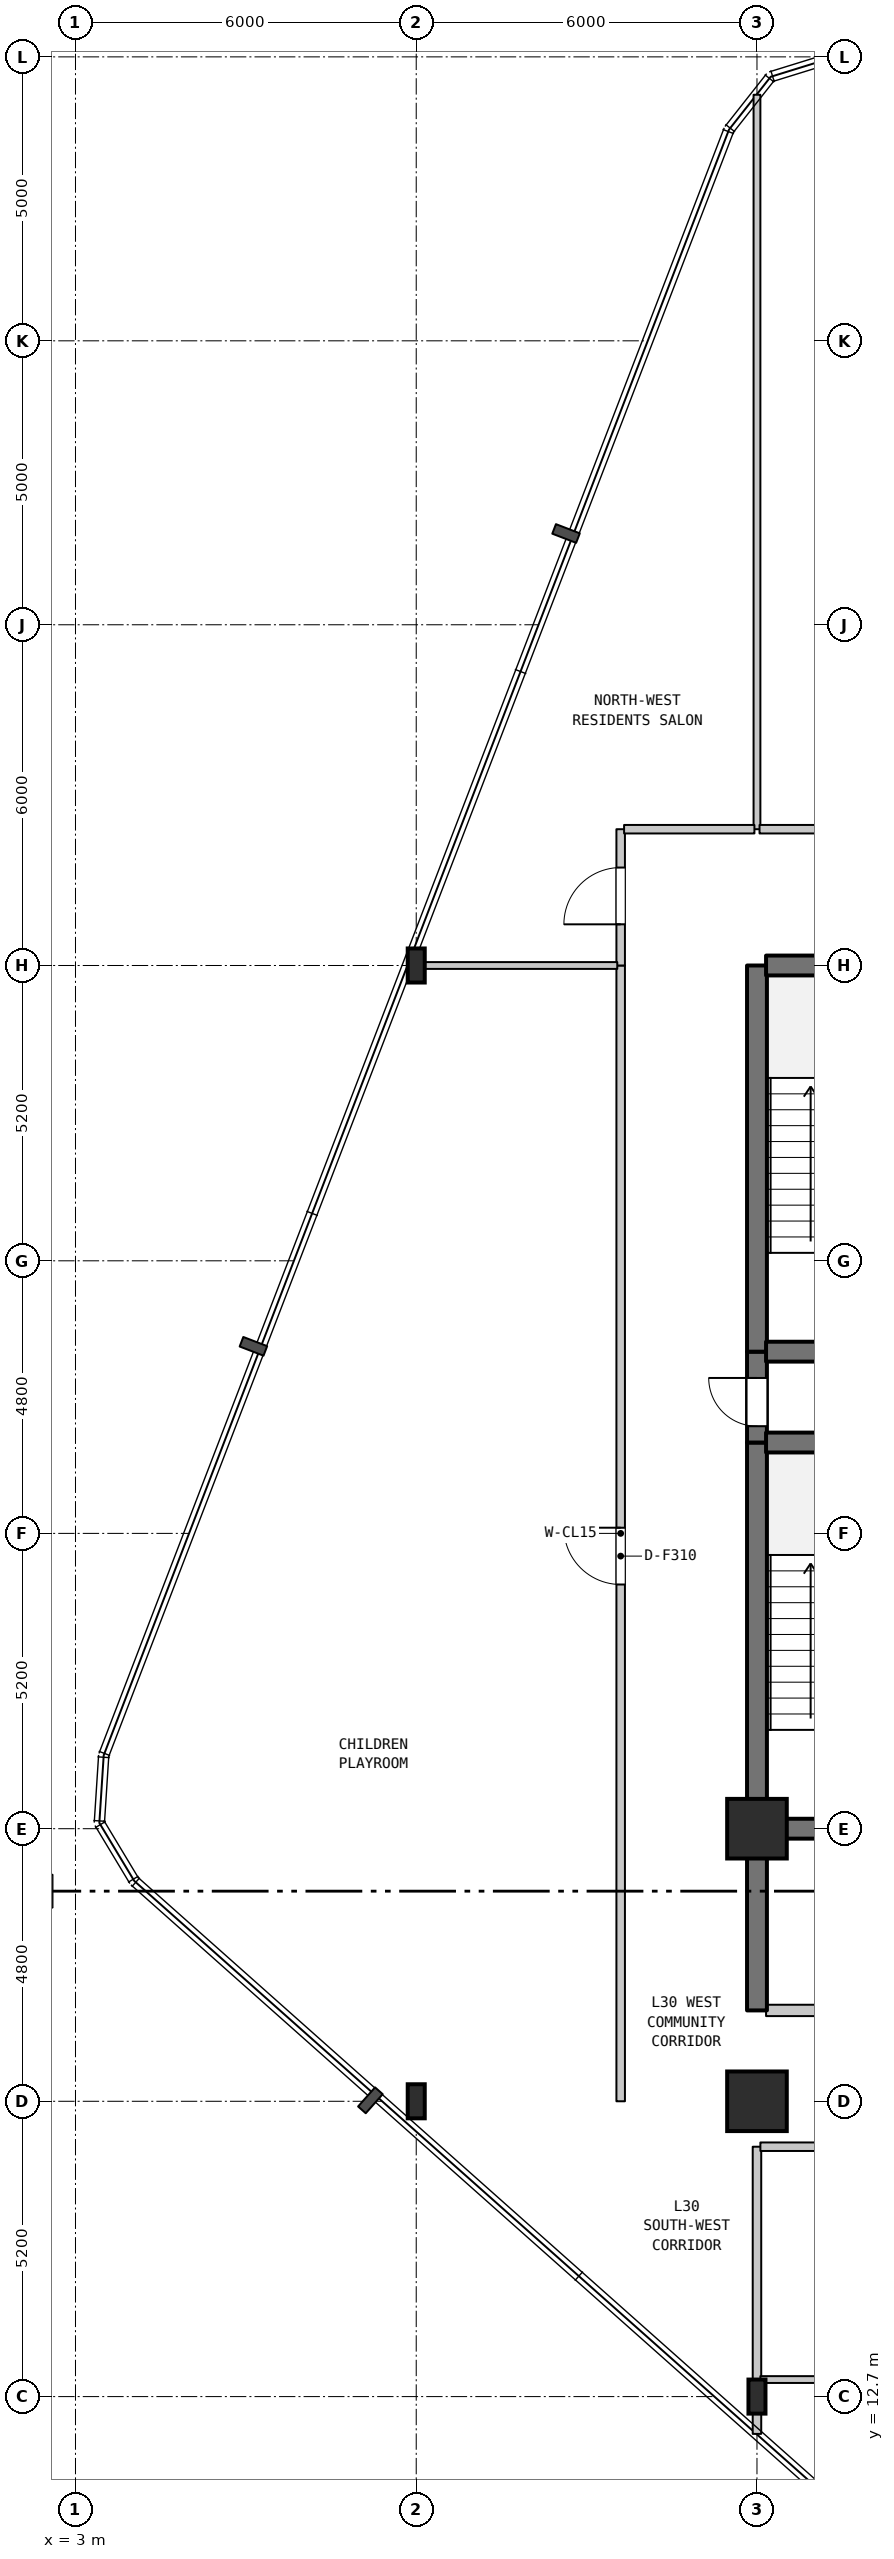
"""IFC4 building model, lengths in metres.
Left out: names, types, materials, properties, quantities, classifications, styles, units other than length and angle.
Written with IfcOpenShell. Run it as: python <this file> out.ifc"""

import sys

from ifc_helpers import new_model, si_unit, direction, frame, frame_2d, origin, origin_2d, place, context, subcontext, project, spatial, rectangle, i_section, extrude, element, fill, save


model = new_model("IFC4")
c1 = context("Model", 3, precision=1e-05, world=origin(), true_north=direction((0.0, 1.0)))
c2 = subcontext(c1, "Body", "Model", "MODEL_VIEW")
j1 = project(units=[si_unit("LENGTHUNIT", "METRE"), si_unit("PLANEANGLEUNIT", "RADIAN")], contexts=[c1])
p1 = place(None, origin())
s1 = spatial("IfcSite", under=j1, at=p1, CompositionType="ELEMENT")
p2 = place(p1, origin())
s2 = spatial("IfcBuilding", under=s1, at=p2, CompositionType="ELEMENT")
p3 = place(p2, frame((0.0, 0.0, 125.3)))
s3 = spatial("IfcBuildingStorey", under=s2, at=p3, CompositionType="ELEMENT", Elevation=125.3)
for number, where, z_axis, x_axis in (
    (1, (9.0, 17.9, 0.0), (0.0, 0.0, 1.0), (1.0, 0.0, 0.0)),
    (2, (9.0, 37.9, 0.0), (0.0, 0.0, 1.0), (1.0, 0.0, 0.0)),
    (3, (15.0, 12.7, 0.0), (0.0, 0.0, 1.0), (1.0, 0.0, 0.0)),
):
    element("IfcColumn", number, at=place(p3, frame(where, z_axis=z_axis, x_axis=x_axis)), inside=s3, PredefinedType="COLUMN", context=c2, shape_type="SweptSolid", body=[
        extrude(i_section(OverallWidth=0.3, OverallDepth=0.6, WebThickness=0.015, FlangeThickness=0.03, FilletRadius=0.027, at=origin_2d()), origin(), (0.0, 0.0, 1.0), 4.5),
    ])
for number, where, z_axis, x_axis in (
    (4, (15.0, 17.9, 0.0), (0.0, 0.0, 1.0), (1.0, 0.0, 0.0)),
    (5, (15.0, 22.7, 0.0), (0.0, 0.0, 1.0), (1.0, 0.0, 0.0)),
):
    element("IfcColumn", number, at=place(p3, frame(where, z_axis=z_axis, x_axis=x_axis)), inside=s3, PredefinedType="COLUMN", context=c2, shape_type="SweptSolid", body=[
        extrude(rectangle(XDim=1.05, YDim=1.05, at=origin_2d()), origin(), (0.0, 0.0, 1.0), 4.5),
    ])
p4 = place(p3, frame((12.6, 17.9, 0.0), z_axis=(0.0, 0.0, 1.0), x_axis=(0.0, 1.0, 0.0)))
e6 = element("IfcWall", 6, at=p4, inside=s3, PredefinedType="STANDARD", context=c2, shape_type="SweptSolid", body=[
    extrude(rectangle(XDim=20.0, YDim=0.15, at=frame_2d((10.0, 0.0))), origin(), (0.0, 0.0, 1.0), 4.185),
])
p5 = place(p4, frame((9.1, 0.0, 0.0)))
e7 = element("IfcOpeningElement", 7, at=p5, cuts=e6, PredefinedType="OPENING", context=c2, shape_type="SweptSolid", body=[
    extrude(rectangle(XDim=1.0, YDim=2.15, at=frame_2d((0.5, 1.075))), frame((0.0, 0.085, 0.0), z_axis=(0.0, -1.0, 0.0), x_axis=(1.0, 0.0, 0.0)), (0.0, 0.0, 1.0), 0.17),
])
p6 = place(p3, frame((12.6, 37.9, 0.0), z_axis=(0.0, 0.0, 1.0), x_axis=(0.0, 1.0, 0.0)))
e8 = element("IfcWall", 8, at=p6, inside=s3, PredefinedType="STANDARD", context=c2, shape_type="SweptSolid", body=[
    extrude(rectangle(XDim=2.4, YDim=0.15, at=frame_2d((1.2, 0.0))), origin(), (0.0, 0.0, 1.0), 4.185),
])
p7 = place(p6, frame((0.725, 0.0, 0.0)))
e9 = element("IfcOpeningElement", 9, at=p7, cuts=e8, PredefinedType="OPENING", context=c2, shape_type="SweptSolid", body=[
    extrude(rectangle(XDim=1.0, YDim=2.15, at=frame_2d((0.5, 1.075))), frame((0.0, 0.085, 0.0), z_axis=(0.0, -1.0, 0.0), x_axis=(1.0, 0.0, 0.0)), (0.0, 0.0, 1.0), 0.17),
])
p8 = place(p3, frame((15.0, 12.043, 0.0), z_axis=(0.0, 0.0, 1.0), x_axis=(0.0, 1.0, 0.0)))
e10 = element("IfcWall", 10, at=p8, inside=s3, PredefinedType="STANDARD", context=c2, shape_type="SweptSolid", body=[
    extrude(rectangle(XDim=0.957, YDim=0.15, at=frame_2d((0.479, 0.0))), origin(), (0.0, 0.0, 1.0), 4.185),
])
p9 = place(p3, frame((15.0, 13.0, 0.0), z_axis=(0.0, 0.0, 1.0), x_axis=(0.0, 1.0, 0.0)))
e11 = element("IfcWall", 11, at=p9, inside=s3, PredefinedType="STANDARD", context=c2, shape_type="SweptSolid", body=[
    extrude(rectangle(XDim=4.1, YDim=0.15, at=frame_2d((2.05, 0.0))), origin(), (0.0, 0.0, 1.0), 3.735),
])
p10 = place(p3, frame((15.0, 19.5, 0.0), z_axis=(0.0, 0.0, 1.0), x_axis=(0.0, 1.0, 0.0)))
e12 = element("IfcWall", 12, at=p10, inside=s3, PredefinedType="SHEAR", context=c2, shape_type="SweptSolid", body=[
    extrude(rectangle(XDim=3.2, YDim=0.35, at=frame_2d((1.6, 0.0))), origin(), (0.0, 0.0, 1.0), 4.185),
])
p11 = place(p3, frame((15.0, 22.7, 0.0), z_axis=(0.0, 0.0, 1.0), x_axis=(0.0, 1.0, 0.0)))
e13 = element("IfcWall", 13, at=p11, inside=s3, PredefinedType="SHEAR", context=c2, shape_type="SweptSolid", body=[
    extrude(rectangle(XDim=6.8, YDim=0.35, at=frame_2d((3.4, 0.0))), origin(), (0.0, 0.0, 1.0), 4.185),
])
p12 = place(p3, frame((15.0, 29.5, 0.0), z_axis=(0.0, 0.0, 1.0), x_axis=(0.0, 1.0, 0.0)))
e14 = element("IfcWall", 14, at=p12, inside=s3, PredefinedType="SHEAR", context=c2, shape_type="SweptSolid", body=[
    extrude(rectangle(XDim=1.6, YDim=0.35, at=frame_2d((0.8, 0.0))), origin(), (0.0, 0.0, 1.0), 4.185),
])
p13 = place(p12, frame((0.287, 0.0, 0.0)))
e15 = element("IfcOpeningElement", 15, at=p13, cuts=e14, PredefinedType="OPENING", context=c2, shape_type="SweptSolid", body=[
    extrude(rectangle(XDim=0.85, YDim=2.1, at=frame_2d((0.425, 1.05))), frame((0.0, 0.185, 0.0), z_axis=(0.0, -1.0, 0.0), x_axis=(1.0, 0.0, 0.0)), (0.0, 0.0, 1.0), 0.37),
])
p14 = place(p3, frame((15.0, 31.1, 0.0), z_axis=(0.0, 0.0, 1.0), x_axis=(0.0, 1.0, 0.0)))
e16 = element("IfcWall", 16, at=p14, inside=s3, PredefinedType="SHEAR", context=c2, shape_type="SweptSolid", body=[
    extrude(rectangle(XDim=6.8, YDim=0.35, at=frame_2d((3.4, 0.0))), origin(), (0.0, 0.0, 1.0), 4.185),
])
p15 = place(p3, frame((15.0, 40.3, 0.0), z_axis=(0.0, 0.0, 1.0), x_axis=(0.0, 1.0, 0.0)))
e17 = element("IfcWall", 17, at=p15, inside=s3, PredefinedType="PARTITIONING", context=c2, shape_type="SweptSolid", body=[
    extrude(rectangle(XDim=12.933, YDim=0.12, at=frame_2d((6.466, 0.0))), origin(), (0.0, 0.0, 1.0), 4.185),
])
p16 = place(p3, frame((15.06, 13.0, 0.0), z_axis=(0.0, 0.0, 1.0), x_axis=(1.0, 0.0, 0.0)))
e18 = element("IfcWall", 18, at=p16, inside=s3, PredefinedType="PARTITIONING", context=c2, shape_type="SweptSolid", body=[
    extrude(rectangle(XDim=7.495, YDim=0.12, at=frame_2d((3.748, 0.0))), origin(), (0.0, 0.0, 1.0), 4.185),
])
p17 = place(p3, frame((15.06, 17.1, 0.0), z_axis=(0.0, 0.0, 1.0), x_axis=(1.0, 0.0, 0.0)))
e19 = element("IfcWall", 19, at=p17, inside=s3, PredefinedType="STANDARD", context=c2, shape_type="SweptSolid", body=[
    extrude(rectangle(XDim=8.295, YDim=0.15, at=frame_2d((4.147, 0.0))), origin(), (0.0, 0.0, 1.0), 4.185),
])
p18 = place(p17, frame((1.595, 0.0, 0.0)))
e20 = element("IfcOpeningElement", 20, at=p18, cuts=e19, PredefinedType="OPENING", context=c2, shape_type="SweptSolid", body=[
    extrude(rectangle(XDim=0.9, YDim=2.1, at=frame_2d((0.45, 1.05))), frame((0.0, 0.085, 0.0), z_axis=(0.0, -1.0, 0.0), x_axis=(1.0, 0.0, 0.0)), (0.0, 0.0, 1.0), 0.17),
])
p19 = place(p17, frame((5.645, 0.0, 0.0)))
e21 = element("IfcOpeningElement", 21, at=p19, cuts=e19, PredefinedType="OPENING", context=c2, shape_type="SweptSolid", body=[
    extrude(rectangle(XDim=0.9, YDim=2.1, at=frame_2d((0.45, 1.05))), frame((0.0, 0.085, 0.0), z_axis=(0.0, -1.0, 0.0), x_axis=(1.0, 0.0, 0.0)), (0.0, 0.0, 1.0), 0.17),
])
p20 = place(p3, frame((15.16, 19.5, 0.0), z_axis=(0.0, 0.0, 1.0), x_axis=(1.0, 0.0, 0.0)))
e22 = element("IfcWall", 22, at=p20, inside=s3, PredefinedType="STANDARD", context=c2, shape_type="SweptSolid", body=[
    extrude(rectangle(XDim=3.68, YDim=0.2, at=frame_2d((1.84, 0.0))), origin(), (0.0, 0.0, 1.0), 4.185),
])
p21 = place(p20, frame((1.39, 0.0, 0.0)))
e23 = element("IfcOpeningElement", 23, at=p21, cuts=e22, PredefinedType="OPENING", context=c2, shape_type="SweptSolid", body=[
    extrude(rectangle(XDim=0.9, YDim=2.15, at=frame_2d((0.45, 1.075))), frame((0.0, 0.11, 0.0), z_axis=(0.0, -1.0, 0.0), x_axis=(1.0, 0.0, 0.0)), (0.0, 0.0, 1.0), 0.22),
])
for number, where, z_axis, x_axis in (
    (24, (15.16, 22.7, 0.0), (0.0, 0.0, 1.0), (1.0, 0.0, 0.0)),
    (25, (15.16, 29.5, 0.0), (0.0, 0.0, 1.0), (1.0, 0.0, 0.0)),
    (26, (15.16, 31.1, 0.0), (0.0, 0.0, 1.0), (1.0, 0.0, 0.0)),
):
    element("IfcWall", number, at=place(p3, frame(where, z_axis=z_axis, x_axis=x_axis)), inside=s3, PredefinedType="SHEAR", context=c2, shape_type="SweptSolid", body=[
        extrude(rectangle(XDim=3.68, YDim=0.35, at=frame_2d((1.84, 0.0))), origin(), (0.0, 0.0, 1.0), 4.185),
    ])
p22 = place(p3, frame((8.856, 37.9, 0.0), z_axis=(0.0, 0.0, 1.0), x_axis=(1.0, 0.0, 0.0)))
e27 = element("IfcWall", 27, at=p22, inside=s3, PredefinedType="PARTITIONING", context=c2, shape_type="SweptSolid", body=[
    extrude(rectangle(XDim=3.684, YDim=0.12, at=frame_2d((1.842, 0.0))), origin(), (0.0, 0.0, 1.0), 3.735),
])
p23 = place(p3, frame((15.16, 37.9, 0.0), z_axis=(0.0, 0.0, 1.0), x_axis=(1.0, 0.0, 0.0)))
e28 = element("IfcWall", 28, at=p23, inside=s3, PredefinedType="SHEAR", context=c2, shape_type="SweptSolid", body=[
    extrude(rectangle(XDim=3.68, YDim=0.35, at=frame_2d((1.84, 0.0))), origin(), (0.0, 0.0, 1.0), 4.185),
])
p24 = place(p3, frame((12.66, 40.3, 0.0), z_axis=(0.0, 0.0, 1.0), x_axis=(1.0, 0.0, 0.0)))
e29 = element("IfcWall", 29, at=p24, inside=s3, PredefinedType="STANDARD", context=c2, shape_type="SweptSolid", body=[
    extrude(rectangle(XDim=2.295, YDim=0.15, at=frame_2d((1.147, 0.0))), origin(), (0.0, 0.0, 1.0), 4.185),
])
p25 = place(p3, frame((15.045, 40.3, 0.0), z_axis=(0.0, 0.0, 1.0), x_axis=(1.0, 0.0, 0.0)))
e30 = element("IfcWall", 30, at=p25, inside=s3, PredefinedType="STANDARD", context=c2, shape_type="SweptSolid", body=[
    extrude(rectangle(XDim=17.895, YDim=0.15, at=frame_2d((8.948, 0.0))), origin(), (0.0, 0.0, 1.0), 4.185),
])
p26 = place(p25, frame((9.205, 0.0, 0.0)))
e31 = element("IfcOpeningElement", 31, at=p26, cuts=e30, PredefinedType="OPENING", context=c2, shape_type="SweptSolid", body=[
    extrude(rectangle(XDim=1.0, YDim=2.15, at=frame_2d((0.5, 1.075))), frame((0.0, 0.085, 0.0), z_axis=(0.0, -1.0, 0.0), x_axis=(1.0, 0.0, 0.0)), (0.0, 0.0, 1.0), 0.17),
])
p27 = place(p5, origin())
e32 = element("IfcDoor", 32, at=p27, inside=s3, OperationType="SINGLE_SWING_RIGHT", PredefinedType="DOOR", context=c2, shape_type="SweptSolid", body=[
    extrude(rectangle(XDim=1.0, YDim=2.15, at=frame_2d((0.5, 1.075))), frame((0.0, 0.025, 0.0), z_axis=(0.0, -1.0, 0.0), x_axis=(1.0, 0.0, 0.0)), (0.0, 0.0, 1.0), 0.05),
])
fill(e7, e32)
p28 = place(p7, origin())
e33 = element("IfcDoor", 33, at=p28, inside=s3, OperationType="SINGLE_SWING_LEFT", PredefinedType="DOOR", context=c2, shape_type="SweptSolid", body=[
    extrude(rectangle(XDim=1.0, YDim=2.15, at=frame_2d((0.5, 1.075))), frame((0.0, 0.025, 0.0), z_axis=(0.0, -1.0, 0.0), x_axis=(1.0, 0.0, 0.0)), (0.0, 0.0, 1.0), 0.05),
])
fill(e9, e33)
p29 = place(p13, origin())
e34 = element("IfcDoor", 34, at=p29, inside=s3, OperationType="SINGLE_SWING_RIGHT", PredefinedType="DOOR", context=c2, shape_type="SweptSolid", body=[
    extrude(rectangle(XDim=0.85, YDim=2.1, at=frame_2d((0.425, 1.05))), frame((0.0, 0.025, 0.0), z_axis=(0.0, -1.0, 0.0), x_axis=(1.0, 0.0, 0.0)), (0.0, 0.0, 1.0), 0.05),
])
fill(e15, e34)
save(model, sys.argv[1])
